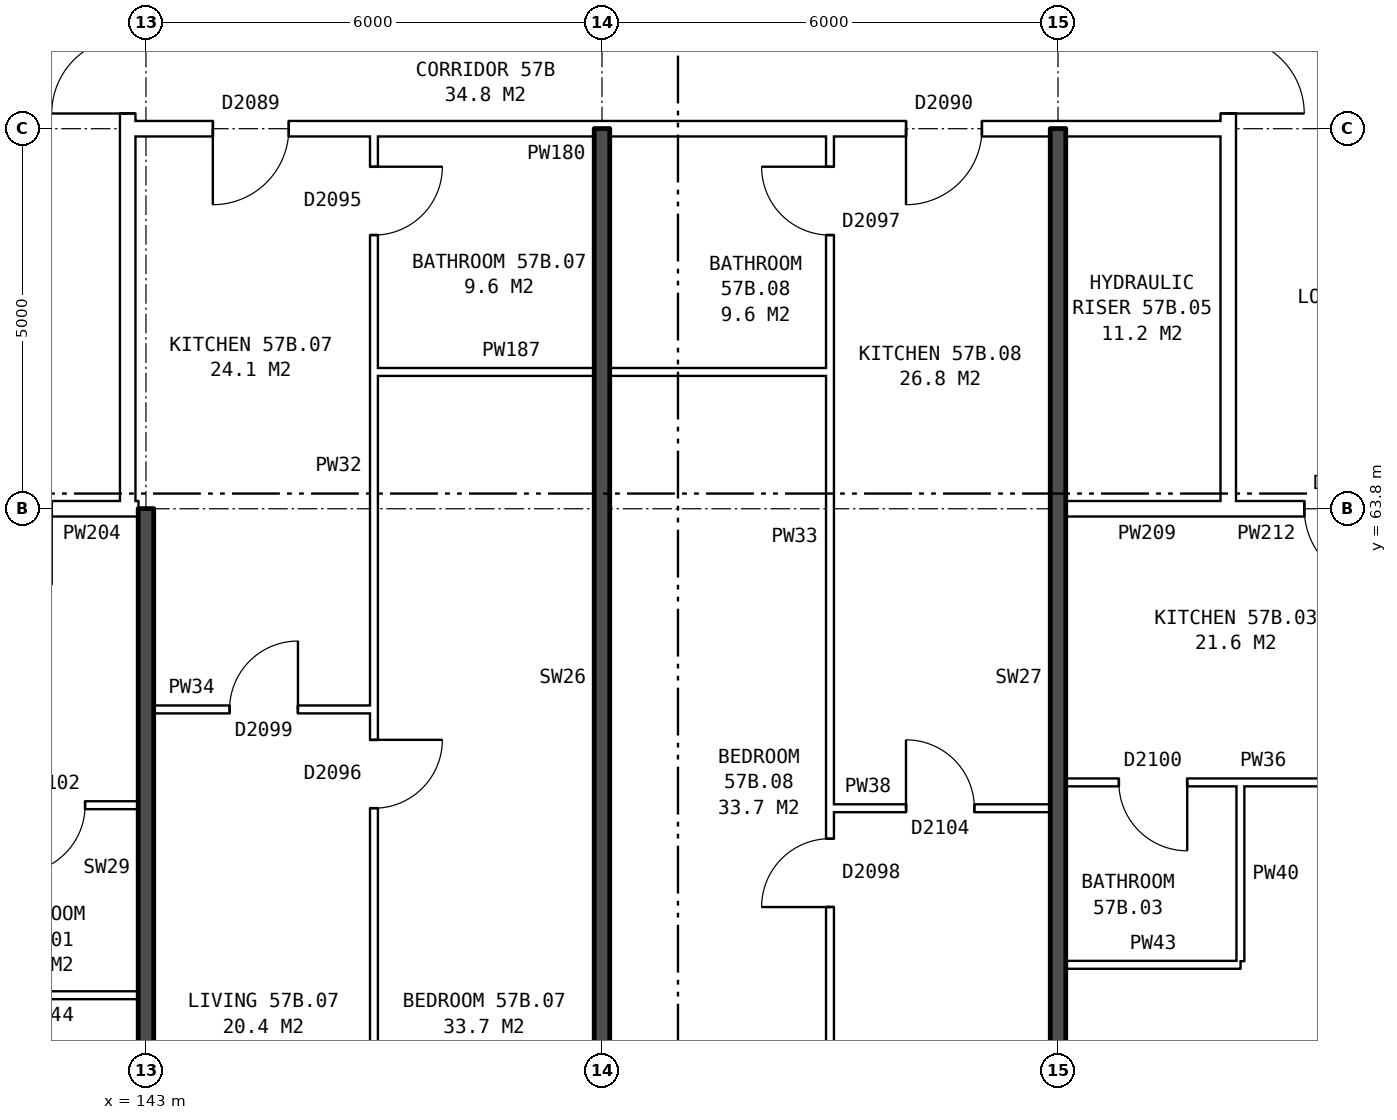
"""IFC4 building model, lengths in metres.
Left out: names, types, materials, properties, quantities, classifications, styles, units other than length and angle.
Written with IfcOpenShell. Run it as: python <this file> out.ifc"""

import sys

from ifc_helpers import new_model, si_unit, direction, frame, frame_2d, origin, place, context, subcontext, project, spatial, rectangle, extrude, element, fill, save


model = new_model("IFC4")
c1 = context("Model", 3, precision=1e-05, world=origin(), true_north=direction((0.0, 1.0)))
c2 = subcontext(c1, "Body", "Model", "MODEL_VIEW")
j1 = project(units=[si_unit("LENGTHUNIT", "METRE"), si_unit("PLANEANGLEUNIT", "RADIAN")], contexts=[c1])
p1 = place(None, origin())
s1 = spatial("IfcSite", under=j1, at=p1, CompositionType="ELEMENT")
p2 = place(p1, origin())
s2 = spatial("IfcBuilding", under=s1, at=p2, CompositionType="ELEMENT")
p3 = place(p2, frame((0.0, 0.0, 202.8)))
s3 = spatial("IfcBuildingStorey", under=s2, at=p3, CompositionType="ELEMENT", Elevation=202.8)
p4 = place(p3, frame((142.76, 63.9, 0.0), z_axis=(0.0, 0.0, 1.0), x_axis=(0.0, 1.0, 0.0)))
e1 = element("IfcWall", 1, at=p4, inside=s3, PredefinedType="PARTITIONING", context=c2, shape_type="SweptSolid", body=[
    extrude(rectangle(XDim=12.2, YDim=0.2, at=frame_2d((6.1, 0.0))), origin(), (0.0, 0.0, 1.0), 2.85),
])
p5 = place(p4, frame((5.1, 0.0, 0.0)))
e2 = element("IfcOpeningElement", 2, at=p5, cuts=e1, PredefinedType="OPENING", context=c2, shape_type="SweptSolid", body=[
    extrude(rectangle(XDim=2.0, YDim=2.1, at=frame_2d((1.0, 1.05))), frame((0.0, 0.11, 0.0), z_axis=(0.0, -1.0, 0.0), x_axis=(1.0, 0.0, 0.0)), (0.0, 0.0, 1.0), 0.22),
])
p6 = place(p3, frame((157.24, 63.9, 0.0), z_axis=(0.0, 0.0, 1.0), x_axis=(0.0, 1.0, 0.0)))
e3 = element("IfcWall", 3, at=p6, inside=s3, PredefinedType="PARTITIONING", context=c2, shape_type="SweptSolid", body=[
    extrude(rectangle(XDim=12.2, YDim=0.2, at=frame_2d((6.1, 0.0))), origin(), (0.0, 0.0, 1.0), 2.85),
])
p7 = place(p6, frame((5.1, 0.0, 0.0)))
e4 = element("IfcOpeningElement", 4, at=p7, cuts=e3, PredefinedType="OPENING", context=c2, shape_type="SweptSolid", body=[
    extrude(rectangle(XDim=2.0, YDim=2.1, at=frame_2d((1.0, 1.05))), frame((0.0, 0.11, 0.0), z_axis=(0.0, -1.0, 0.0), x_axis=(1.0, 0.0, 0.0)), (0.0, 0.0, 1.0), 0.22),
])
for number, where, z_axis, x_axis in (
    (5, (140.6, 57.4, 0.0), (0.0, 0.0, 1.0), (1.0, 0.0, 0.0)),
    (6, (155.1, 57.8, 0.0), (0.0, 0.0, 1.0), (1.0, 0.0, 0.0)),
):
    element("IfcWall", number, at=place(p3, frame(where, z_axis=z_axis, x_axis=x_axis)), inside=s3, PredefinedType="PARTITIONING", context=c2, shape_type="SweptSolid", body=[
        extrude(rectangle(XDim=2.3, YDim=0.1, at=frame_2d((1.15, 0.0))), origin(), (0.0, 0.0, 1.0), 2.85),
    ])
p8 = place(p3, frame((152.0, 59.86, 0.0), z_axis=(0.0, 0.0, 1.0), x_axis=(1.0, 0.0, 0.0)))
e7 = element("IfcWall", 7, at=p8, inside=s3, PredefinedType="PARTITIONING", context=c2, shape_type="SweptSolid", body=[
    extrude(rectangle(XDim=2.9, YDim=0.1, at=frame_2d((1.45, 0.0))), origin(), (0.0, 0.0, 1.0), 2.85),
])
p9 = place(p8, frame((1.0, 0.0, 0.0)))
e8 = element("IfcOpeningElement", 8, at=p9, cuts=e7, PredefinedType="OPENING", context=c2, shape_type="SweptSolid", body=[
    extrude(rectangle(XDim=0.9, YDim=2.1, at=frame_2d((0.45, 1.05))), frame((0.0, 0.06, 0.0), z_axis=(0.0, -1.0, 0.0), x_axis=(1.0, 0.0, 0.0)), (0.0, 0.0, 1.0), 0.12),
])
p10 = place(p3, frame((137.1, 59.9, 0.0), z_axis=(0.0, 0.0, 1.0), x_axis=(1.0, 0.0, 0.0)))
e9 = element("IfcWall", 9, at=p10, inside=s3, PredefinedType="PARTITIONING", context=c2, shape_type="SweptSolid", body=[
    extrude(rectangle(XDim=5.8, YDim=0.1, at=frame_2d((2.9, 0.0))), origin(), (0.0, 0.0, 1.0), 2.85),
])
p11 = place(p10, frame((1.3, 0.0, 0.0)))
e10 = element("IfcOpeningElement", 10, at=p11, cuts=e9, PredefinedType="OPENING", context=c2, shape_type="SweptSolid", body=[
    extrude(rectangle(XDim=0.9, YDim=2.1, at=frame_2d((0.45, 1.05))), frame((0.0, 0.06, 0.0), z_axis=(0.0, -1.0, 0.0), x_axis=(1.0, 0.0, 0.0)), (0.0, 0.0, 1.0), 0.12),
])
p12 = place(p10, frame((4.2, 0.0, 0.0)))
e11 = element("IfcOpeningElement", 11, at=p12, cuts=e9, PredefinedType="OPENING", context=c2, shape_type="SweptSolid", body=[
    extrude(rectangle(XDim=0.9, YDim=2.1, at=frame_2d((0.45, 1.05))), frame((0.0, 0.06, 0.0), z_axis=(0.0, -1.0, 0.0), x_axis=(1.0, 0.0, 0.0)), (0.0, 0.0, 1.0), 0.12),
])
p13 = place(p3, frame((155.1, 60.2, 0.0), z_axis=(0.0, 0.0, 1.0), x_axis=(1.0, 0.0, 0.0)))
e12 = element("IfcWall", 12, at=p13, inside=s3, PredefinedType="PARTITIONING", context=c2, shape_type="SweptSolid", body=[
    extrude(rectangle(XDim=5.8, YDim=0.1, at=frame_2d((2.9, 0.0))), origin(), (0.0, 0.0, 1.0), 2.85),
])
p14 = place(p13, frame((3.6, 0.0, 0.0)))
e13 = element("IfcOpeningElement", 13, at=p14, cuts=e12, PredefinedType="OPENING", context=c2, shape_type="SweptSolid", body=[
    extrude(rectangle(XDim=0.9, YDim=2.1, at=frame_2d((0.45, 1.05))), frame((0.0, 0.06, 0.0), z_axis=(0.0, -1.0, 0.0), x_axis=(1.0, 0.0, 0.0)), (0.0, 0.0, 1.0), 0.12),
])
p15 = place(p13, frame((0.7, 0.0, 0.0)))
e14 = element("IfcOpeningElement", 14, at=p15, cuts=e12, PredefinedType="OPENING", context=c2, shape_type="SweptSolid", body=[
    extrude(rectangle(XDim=0.9, YDim=2.1, at=frame_2d((0.45, 1.05))), frame((0.0, 0.06, 0.0), z_axis=(0.0, -1.0, 0.0), x_axis=(1.0, 0.0, 0.0)), (0.0, 0.0, 1.0), 0.12),
])
p16 = place(p3, frame((143.1, 61.16, 0.0), z_axis=(0.0, 0.0, 1.0), x_axis=(1.0, 0.0, 0.0)))
e15 = element("IfcWall", 15, at=p16, inside=s3, PredefinedType="PARTITIONING", context=c2, shape_type="SweptSolid", body=[
    extrude(rectangle(XDim=2.9, YDim=0.1, at=frame_2d((1.45, 0.0))), origin(), (0.0, 0.0, 1.0), 2.85),
])
p17 = place(p16, frame((1.0, 0.0, 0.0)))
e16 = element("IfcOpeningElement", 16, at=p17, cuts=e15, PredefinedType="OPENING", context=c2, shape_type="SweptSolid", body=[
    extrude(rectangle(XDim=0.9, YDim=2.1, at=frame_2d((0.45, 1.05))), frame((0.0, 0.06, 0.0), z_axis=(0.0, -1.0, 0.0), x_axis=(1.0, 0.0, 0.0)), (0.0, 0.0, 1.0), 0.12),
])
p18 = place(p3, frame((139.76, 63.8, 0.0), z_axis=(0.0, 0.0, 1.0), x_axis=(1.0, 0.0, 0.0)))
e17 = element("IfcWall", 17, at=p18, inside=s3, PredefinedType="PARTITIONING", context=c2, shape_type="SweptSolid", body=[
    extrude(rectangle(XDim=3.0, YDim=0.2, at=frame_2d((1.5, 0.0))), origin(), (0.0, 0.0, 1.0), 2.85),
])
p19 = place(p18, frame((1.0, 0.0, 0.0)))
e18 = element("IfcOpeningElement", 18, at=p19, cuts=e17, PredefinedType="OPENING", context=c2, shape_type="SweptSolid", body=[
    extrude(rectangle(XDim=1.0, YDim=2.1, at=frame_2d((0.5, 1.05))), frame((0.0, 0.11, 0.0), z_axis=(0.0, -1.0, 0.0), x_axis=(1.0, 0.0, 0.0)), (0.0, 0.0, 1.0), 0.22),
])
p20 = place(p3, frame((142.76, 63.8, 0.0), z_axis=(0.0, 0.0, 1.0), x_axis=(1.0, 0.0, 0.0)))
e19 = element("IfcWall", 19, at=p20, inside=s3, PredefinedType="PARTITIONING", context=c2, shape_type="SweptSolid", body=[
    extrude(rectangle(XDim=0.14, YDim=0.2, at=frame_2d((0.07, 0.0))), origin(), (0.0, 0.0, 1.0), 2.85),
])
p21 = place(p3, frame((155.1, 63.8, 0.0), z_axis=(0.0, 0.0, 1.0), x_axis=(1.0, 0.0, 0.0)))
e20 = element("IfcWall", 20, at=p21, inside=s3, PredefinedType="PARTITIONING", context=c2, shape_type="SweptSolid", body=[
    extrude(rectangle(XDim=2.14, YDim=0.2, at=frame_2d((1.07, 0.0))), origin(), (0.0, 0.0, 1.0), 2.85),
])
p22 = place(p3, frame((157.24, 63.8, 0.0), z_axis=(0.0, 0.0, 1.0), x_axis=(1.0, 0.0, 0.0)))
e21 = element("IfcWall", 21, at=p22, inside=s3, PredefinedType="PARTITIONING", context=c2, shape_type="SweptSolid", body=[
    extrude(rectangle(XDim=3.0, YDim=0.2, at=frame_2d((1.5, 0.0))), origin(), (0.0, 0.0, 1.0), 2.85),
])
p23 = place(p22, frame((1.0, 0.0, 0.0)))
e22 = element("IfcOpeningElement", 22, at=p23, cuts=e21, PredefinedType="OPENING", context=c2, shape_type="SweptSolid", body=[
    extrude(rectangle(XDim=1.0, YDim=2.1, at=frame_2d((0.5, 1.05))), frame((0.0, 0.11, 0.0), z_axis=(0.0, -1.0, 0.0), x_axis=(1.0, 0.0, 0.0)), (0.0, 0.0, 1.0), 0.22),
])
p24 = place(p3, frame((146.0, 65.6, 0.0), z_axis=(0.0, 0.0, 1.0), x_axis=(1.0, 0.0, 0.0)))
e23 = element("IfcWall", 23, at=p24, inside=s3, PredefinedType="PARTITIONING", context=c2, shape_type="SweptSolid", body=[
    extrude(rectangle(XDim=6.0, YDim=0.1, at=frame_2d((3.0, 0.0))), origin(), (0.0, 0.0, 1.0), 2.85),
])
p25 = place(p3, frame((142.76, 68.8, 0.0), z_axis=(0.0, 0.0, 1.0), x_axis=(1.0, 0.0, 0.0)))
e24 = element("IfcWall", 24, at=p25, inside=s3, PredefinedType="PARTITIONING", context=c2, shape_type="SweptSolid", body=[
    extrude(rectangle(XDim=14.48, YDim=0.2, at=frame_2d((7.24, 0.0))), origin(), (0.0, 0.0, 1.0), 2.85),
])
p26 = place(p25, frame((1.12, 0.0, 0.0)))
e25 = element("IfcOpeningElement", 25, at=p26, cuts=e24, PredefinedType="OPENING", context=c2, shape_type="SweptSolid", body=[
    extrude(rectangle(XDim=1.0, YDim=2.1, at=frame_2d((0.5, 1.05))), frame((0.0, 0.11, 0.0), z_axis=(0.0, -1.0, 0.0), x_axis=(1.0, 0.0, 0.0)), (0.0, 0.0, 1.0), 0.22),
])
p27 = place(p25, frame((10.24, 0.0, 0.0)))
e26 = element("IfcOpeningElement", 26, at=p27, cuts=e24, PredefinedType="OPENING", context=c2, shape_type="SweptSolid", body=[
    extrude(rectangle(XDim=1.0, YDim=2.1, at=frame_2d((0.5, 1.05))), frame((0.0, 0.11, 0.0), z_axis=(0.0, -1.0, 0.0), x_axis=(1.0, 0.0, 0.0)), (0.0, 0.0, 1.0), 0.22),
])
p28 = place(p3, frame((143.0, 54.36, 0.0), z_axis=(0.0, 0.0, 1.0), x_axis=(0.0, 1.0, 0.0)))
e27 = element("IfcWall", 27, at=p28, inside=s3, PredefinedType="SOLIDWALL", context=c2, shape_type="SweptSolid", body=[
    extrude(rectangle(XDim=9.44, YDim=0.2, at=frame_2d((4.72, 0.0))), origin(), (0.0, 0.0, 1.0), 2.85),
])
p29 = place(p3, frame((146.0, 54.36, 0.0), z_axis=(0.0, 0.0, 1.0), x_axis=(0.0, 1.0, 0.0)))
e28 = element("IfcWall", 28, at=p29, inside=s3, PredefinedType="PARTITIONING", context=c2, shape_type="SweptSolid", body=[
    extrude(rectangle(XDim=14.34, YDim=0.1, at=frame_2d((7.17, 0.0))), origin(), (0.0, 0.0, 1.0), 2.85),
])
p30 = place(p29, frame((5.5, 0.0, 0.0)))
e29 = element("IfcOpeningElement", 29, at=p30, cuts=e28, PredefinedType="OPENING", context=c2, shape_type="SweptSolid", body=[
    extrude(rectangle(XDim=0.9, YDim=2.1, at=frame_2d((0.45, 1.05))), frame((0.0, 0.06, 0.0), z_axis=(0.0, -1.0, 0.0), x_axis=(1.0, 0.0, 0.0)), (0.0, 0.0, 1.0), 0.12),
])
p31 = place(p29, frame((13.04, 0.0, 0.0)))
e30 = element("IfcOpeningElement", 30, at=p31, cuts=e28, PredefinedType="OPENING", context=c2, shape_type="SweptSolid", body=[
    extrude(rectangle(XDim=0.9, YDim=2.1, at=frame_2d((0.45, 1.05))), frame((0.0, 0.06, 0.0), z_axis=(0.0, -1.0, 0.0), x_axis=(1.0, 0.0, 0.0)), (0.0, 0.0, 1.0), 0.12),
])
p32 = place(p3, frame((149.0, 54.36, 0.0), z_axis=(0.0, 0.0, 1.0), x_axis=(0.0, 1.0, 0.0)))
e31 = element("IfcWall", 31, at=p32, inside=s3, PredefinedType="SOLIDWALL", context=c2, shape_type="SweptSolid", body=[
    extrude(rectangle(XDim=14.44, YDim=0.2, at=frame_2d((7.22, 0.0))), origin(), (0.0, 0.0, 1.0), 2.85),
])
p33 = place(p3, frame((152.0, 54.36, 0.0), z_axis=(0.0, 0.0, 1.0), x_axis=(0.0, 1.0, 0.0)))
e32 = element("IfcWall", 32, at=p33, inside=s3, PredefinedType="PARTITIONING", context=c2, shape_type="SweptSolid", body=[
    extrude(rectangle(XDim=14.34, YDim=0.1, at=frame_2d((7.17, 0.0))), origin(), (0.0, 0.0, 1.0), 2.85),
])
p34 = place(p33, frame((4.2, 0.0, 0.0)))
e33 = element("IfcOpeningElement", 33, at=p34, cuts=e32, PredefinedType="OPENING", context=c2, shape_type="SweptSolid", body=[
    extrude(rectangle(XDim=0.9, YDim=2.1, at=frame_2d((0.45, 1.05))), frame((0.0, 0.06, 0.0), z_axis=(0.0, -1.0, 0.0), x_axis=(1.0, 0.0, 0.0)), (0.0, 0.0, 1.0), 0.12),
])
p35 = place(p33, frame((13.04, 0.0, 0.0)))
e34 = element("IfcOpeningElement", 34, at=p35, cuts=e32, PredefinedType="OPENING", context=c2, shape_type="SweptSolid", body=[
    extrude(rectangle(XDim=0.9, YDim=2.1, at=frame_2d((0.45, 1.05))), frame((0.0, 0.06, 0.0), z_axis=(0.0, -1.0, 0.0), x_axis=(1.0, 0.0, 0.0)), (0.0, 0.0, 1.0), 0.12),
])
p36 = place(p3, frame((155.0, 54.36, 0.0), z_axis=(0.0, 0.0, 1.0), x_axis=(0.0, 1.0, 0.0)))
e35 = element("IfcWall", 35, at=p36, inside=s3, PredefinedType="SOLIDWALL", context=c2, shape_type="SweptSolid", body=[
    extrude(rectangle(XDim=14.44, YDim=0.2, at=frame_2d((7.22, 0.0))), origin(), (0.0, 0.0, 1.0), 2.85),
])
p37 = place(p3, frame((157.4, 57.85, 0.0), z_axis=(0.0, 0.0, 1.0), x_axis=(0.0, 1.0, 0.0)))
e36 = element("IfcWall", 36, at=p37, inside=s3, PredefinedType="PARTITIONING", context=c2, shape_type="SweptSolid", body=[
    extrude(rectangle(XDim=2.3, YDim=0.1, at=frame_2d((1.15, 0.0))), origin(), (0.0, 0.0, 1.0), 2.85),
])
p38 = place(p5, origin())
e37 = element("IfcDoor", 37, at=p38, inside=s3, OperationType="DOUBLE_DOOR_SINGLE_SWING", PredefinedType="DOOR", context=c2, shape_type="SweptSolid", body=[
    extrude(rectangle(XDim=2.0, YDim=2.1, at=frame_2d((1.0, 1.05))), frame((0.0, 0.025, 0.0), z_axis=(0.0, -1.0, 0.0), x_axis=(1.0, 0.0, 0.0)), (0.0, 0.0, 1.0), 0.05),
])
fill(e2, e37)
p39 = place(p7, frame((2.0, 0.0, 0.0), z_axis=(0.0, 0.0, 1.0), x_axis=(-1.0, 0.0, 0.0)))
e38 = element("IfcDoor", 38, at=p39, inside=s3, OperationType="DOUBLE_DOOR_SINGLE_SWING", PredefinedType="DOOR", context=c2, shape_type="SweptSolid", body=[
    extrude(rectangle(XDim=2.0, YDim=2.1, at=frame_2d((1.0, 1.05))), frame((0.0, 0.025, 0.0), z_axis=(0.0, -1.0, 0.0), x_axis=(1.0, 0.0, 0.0)), (0.0, 0.0, 1.0), 0.05),
])
fill(e4, e38)
p40 = place(p12, frame((0.9, 0.0, 0.0), z_axis=(0.0, 0.0, 1.0), x_axis=(-1.0, 0.0, 0.0)))
e39 = element("IfcDoor", 39, at=p40, inside=s3, OperationType="SINGLE_SWING_RIGHT", PredefinedType="DOOR", context=c2, shape_type="SweptSolid", body=[
    extrude(rectangle(XDim=0.9, YDim=2.1, at=frame_2d((0.45, 1.05))), frame((0.0, 0.025, 0.0), z_axis=(0.0, -1.0, 0.0), x_axis=(1.0, 0.0, 0.0)), (0.0, 0.0, 1.0), 0.05),
])
fill(e11, e39)
p41 = place(p23, frame((1.0, 0.0, 0.0), z_axis=(0.0, 0.0, 1.0), x_axis=(-1.0, 0.0, 0.0)))
e40 = element("IfcDoor", 40, at=p41, inside=s3, OperationType="SINGLE_SWING_LEFT", PredefinedType="DOOR", context=c2, shape_type="SweptSolid", body=[
    extrude(rectangle(XDim=1.0, YDim=2.1, at=frame_2d((0.5, 1.05))), frame((0.0, 0.025, 0.0), z_axis=(0.0, -1.0, 0.0), x_axis=(1.0, 0.0, 0.0)), (0.0, 0.0, 1.0), 0.05),
])
fill(e22, e40)
p42 = place(p15, frame((0.9, 0.0, 0.0), z_axis=(0.0, 0.0, 1.0), x_axis=(-1.0, 0.0, 0.0)))
e41 = element("IfcDoor", 41, at=p42, inside=s3, OperationType="SINGLE_SWING_LEFT", PredefinedType="DOOR", context=c2, shape_type="SweptSolid", body=[
    extrude(rectangle(XDim=0.9, YDim=2.1, at=frame_2d((0.45, 1.05))), frame((0.0, 0.025, 0.0), z_axis=(0.0, -1.0, 0.0), x_axis=(1.0, 0.0, 0.0)), (0.0, 0.0, 1.0), 0.05),
])
fill(e14, e41)
p43 = place(p30, frame((0.9, 0.0, 0.0), z_axis=(0.0, 0.0, 1.0), x_axis=(-1.0, 0.0, 0.0)))
e42 = element("IfcDoor", 42, at=p43, inside=s3, OperationType="SINGLE_SWING_LEFT", PredefinedType="DOOR", context=c2, shape_type="SweptSolid", body=[
    extrude(rectangle(XDim=0.9, YDim=2.1, at=frame_2d((0.45, 1.05))), frame((0.0, 0.025, 0.0), z_axis=(0.0, -1.0, 0.0), x_axis=(1.0, 0.0, 0.0)), (0.0, 0.0, 1.0), 0.05),
])
fill(e29, e42)
p44 = place(p26, frame((1.0, 0.0, 0.0), z_axis=(0.0, 0.0, 1.0), x_axis=(-1.0, 0.0, 0.0)))
e43 = element("IfcDoor", 43, at=p44, inside=s3, OperationType="SINGLE_SWING_RIGHT", PredefinedType="DOOR", context=c2, shape_type="SweptSolid", body=[
    extrude(rectangle(XDim=1.0, YDim=2.1, at=frame_2d((0.5, 1.05))), frame((0.0, 0.025, 0.0), z_axis=(0.0, -1.0, 0.0), x_axis=(1.0, 0.0, 0.0)), (0.0, 0.0, 1.0), 0.05),
])
fill(e25, e43)
p45 = place(p17, origin())
e44 = element("IfcDoor", 44, at=p45, inside=s3, OperationType="SINGLE_SWING_RIGHT", PredefinedType="DOOR", context=c2, shape_type="SweptSolid", body=[
    extrude(rectangle(XDim=0.9, YDim=2.1, at=frame_2d((0.45, 1.05))), frame((0.0, 0.025, 0.0), z_axis=(0.0, -1.0, 0.0), x_axis=(1.0, 0.0, 0.0)), (0.0, 0.0, 1.0), 0.05),
])
fill(e16, e44)
p46 = place(p31, frame((0.9, 0.0, 0.0), z_axis=(0.0, 0.0, 1.0), x_axis=(-1.0, 0.0, 0.0)))
e45 = element("IfcDoor", 45, at=p46, inside=s3, OperationType="SINGLE_SWING_LEFT", PredefinedType="DOOR", context=c2, shape_type="SweptSolid", body=[
    extrude(rectangle(XDim=0.9, YDim=2.1, at=frame_2d((0.45, 1.05))), frame((0.0, 0.025, 0.0), z_axis=(0.0, -1.0, 0.0), x_axis=(1.0, 0.0, 0.0)), (0.0, 0.0, 1.0), 0.05),
])
fill(e30, e45)
p47 = place(p34, origin())
e46 = element("IfcDoor", 46, at=p47, inside=s3, OperationType="SINGLE_SWING_LEFT", PredefinedType="DOOR", context=c2, shape_type="SweptSolid", body=[
    extrude(rectangle(XDim=0.9, YDim=2.1, at=frame_2d((0.45, 1.05))), frame((0.0, 0.025, 0.0), z_axis=(0.0, -1.0, 0.0), x_axis=(1.0, 0.0, 0.0)), (0.0, 0.0, 1.0), 0.05),
])
fill(e33, e46)
p48 = place(p27, frame((1.0, 0.0, 0.0), z_axis=(0.0, 0.0, 1.0), x_axis=(-1.0, 0.0, 0.0)))
e47 = element("IfcDoor", 47, at=p48, inside=s3, OperationType="SINGLE_SWING_RIGHT", PredefinedType="DOOR", context=c2, shape_type="SweptSolid", body=[
    extrude(rectangle(XDim=1.0, YDim=2.1, at=frame_2d((0.5, 1.05))), frame((0.0, 0.025, 0.0), z_axis=(0.0, -1.0, 0.0), x_axis=(1.0, 0.0, 0.0)), (0.0, 0.0, 1.0), 0.05),
])
fill(e26, e47)
p49 = place(p9, origin())
e48 = element("IfcDoor", 48, at=p49, inside=s3, OperationType="SINGLE_SWING_LEFT", PredefinedType="DOOR", context=c2, shape_type="SweptSolid", body=[
    extrude(rectangle(XDim=0.9, YDim=2.1, at=frame_2d((0.45, 1.05))), frame((0.0, 0.025, 0.0), z_axis=(0.0, -1.0, 0.0), x_axis=(1.0, 0.0, 0.0)), (0.0, 0.0, 1.0), 0.05),
])
fill(e8, e48)
p50 = place(p35, origin())
e49 = element("IfcDoor", 49, at=p50, inside=s3, OperationType="SINGLE_SWING_RIGHT", PredefinedType="DOOR", context=c2, shape_type="SweptSolid", body=[
    extrude(rectangle(XDim=0.9, YDim=2.1, at=frame_2d((0.45, 1.05))), frame((0.0, 0.025, 0.0), z_axis=(0.0, -1.0, 0.0), x_axis=(1.0, 0.0, 0.0)), (0.0, 0.0, 1.0), 0.05),
])
fill(e34, e49)
save(model, sys.argv[1])
